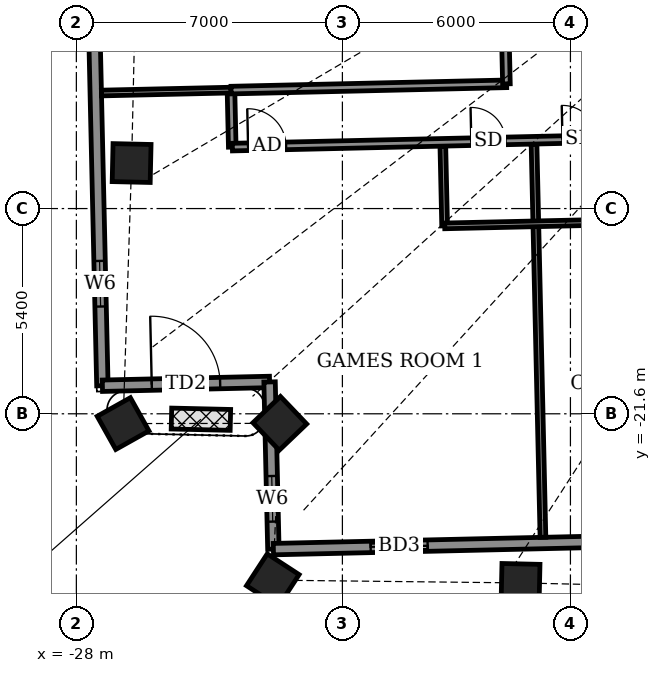
"""IFC4 building model, lengths in metres.
Left out: names, types, materials, properties, quantities, classifications, styles, units other than length and angle.
Written with IfcOpenShell. Run it as: python <this file> out.ifc"""

import sys

from ifc_helpers import new_model, si_unit, direction, frame, frame_2d, origin, origin_2d, place, context, subcontext, project, spatial, rectangle, extrude, element, fill, save


model = new_model("IFC4")
c1 = context("Model", 3, precision=1e-05, world=origin(), true_north=direction((0.0, 1.0)))
c2 = subcontext(c1, "Body", "Model", "MODEL_VIEW")
j1 = project(units=[si_unit("LENGTHUNIT", "METRE"), si_unit("PLANEANGLEUNIT", "RADIAN")], contexts=[c1])
p1 = place(None, origin())
s1 = spatial("IfcSite", under=j1, at=p1, CompositionType="ELEMENT")
p2 = place(p1, origin())
s2 = spatial("IfcBuilding", under=s1, at=p2, CompositionType="ELEMENT")
p3 = place(p2, frame((0.0, 0.0, 275.3)))
s3 = spatial("IfcBuildingStorey", under=s2, at=p3, CompositionType="ELEMENT", Elevation=275.3)
for number, where, z_axis, x_axis in (
    (1, (-26.546, -15.002, -0.55), (0.0, 0.0, 1.0), (-0.023, -1.0, 0.0)),
    (2, (-26.771, -21.858, -0.55), (0.0, 0.0, 1.0), (0.489, -0.872, 0.0)),
    (3, (-22.646, -21.852, -0.55), (0.0, 0.0, 1.0), (0.691, -0.723, 0.0)),
    (4, (-22.831, -25.977, -0.55), (0.0, 0.0, 1.0), (0.838, -0.546, 0.0)),
    (5, (-16.313, -26.05, -0.55), (0.0, 0.0, 1.0), (1.0, -0.023, 0.0)),
):
    element("IfcColumn", number, at=place(p3, frame(where, z_axis=z_axis, x_axis=x_axis)), inside=s3, PredefinedType="COLUMN", context=c2, shape_type="SweptSolid", body=[
        extrude(rectangle(XDim=1.0, YDim=1.0, at=origin_2d()), origin(), (0.0, 0.0, 1.0), 4.6),
    ])
p4 = place(p3, frame((-27.658, -5.735, 0.0), z_axis=(0.0, 0.0, 1.0), x_axis=(0.022670092247, -0.999743000434, 0.0)))
e6 = element("IfcWall", 6, at=p4, inside=s3, PredefinedType="SOLIDWALL", context=c2, shape_type="SweptSolid", body=[
    extrude(rectangle(XDim=15.131, YDim=0.3, at=frame_2d((7.565, 0.0))), origin(), (0.0, 0.0, 1.0), 2.35),
])
p5 = place(p4, frame((4.194, 0.0, 0.0)))
e7 = element("IfcOpeningElement", 7, at=p5, cuts=e6, PredefinedType="OPENING", context=c2, shape_type="SweptSolid", body=[
    extrude(rectangle(XDim=1.5, YDim=2.0, at=frame_2d((0.75, 1.0))), frame((0.0, 0.16, 0.0), z_axis=(0.0, -1.0, 0.0), x_axis=(1.0, 0.0, 0.0)), (0.0, 0.0, 1.0), 0.32),
])
p6 = place(p4, frame((11.846, 0.0, 0.5)))
e8 = element("IfcOpeningElement", 8, at=p6, cuts=e6, PredefinedType="OPENING", context=c2, shape_type="SweptSolid", body=[
    extrude(rectangle(XDim=1.2, YDim=1.1, at=frame_2d((0.6, 0.55))), frame((0.0, 0.16, 0.0), z_axis=(0.0, -1.0, 0.0), x_axis=(1.0, 0.0, 0.0)), (0.0, 0.0, 1.0), 0.32),
])
p7 = place(p3, frame((-27.315, -20.862, 0.0), z_axis=(0.0, 0.0, 1.0), x_axis=(0.999741204967, 0.022749133868, 0.0)))
e9 = element("IfcWall", 9, at=p7, inside=s3, PredefinedType="SOLIDWALL", context=c2, shape_type="SweptSolid", body=[
    extrude(rectangle(XDim=4.4, YDim=0.3, at=frame_2d((2.2, 0.0))), origin(), (0.0, 0.0, 1.0), 2.35),
])
p8 = place(p7, frame((1.299, 0.0, 0.0)))
e10 = element("IfcOpeningElement", 10, at=p8, cuts=e9, PredefinedType="OPENING", context=c2, shape_type="SweptSolid", body=[
    extrude(rectangle(XDim=1.8, YDim=2.0, at=frame_2d((0.9, 1.0))), frame((0.0, 0.16, 0.0), z_axis=(0.0, -1.0, 0.0), x_axis=(1.0, 0.0, 0.0)), (0.0, 0.0, 1.0), 0.32),
])
p9 = place(p3, frame((-22.916, -20.762, 0.0), z_axis=(0.0, 0.0, 1.0), x_axis=(0.022749133868, -0.999741204967, 0.0)))
e11 = element("IfcWall", 11, at=p9, inside=s3, PredefinedType="SOLIDWALL", context=c2, shape_type="SweptSolid", body=[
    extrude(rectangle(XDim=4.4, YDim=0.3, at=frame_2d((2.2, 0.0))), origin(), (0.0, 0.0, 1.0), 2.35),
])
p10 = place(p9, frame((2.476, 0.0, 0.5)))
e12 = element("IfcOpeningElement", 12, at=p10, cuts=e11, PredefinedType="OPENING", context=c2, shape_type="SweptSolid", body=[
    extrude(rectangle(XDim=1.2, YDim=1.1, at=frame_2d((0.6, 0.55))), frame((0.0, 0.16, 0.0), z_axis=(0.0, -1.0, 0.0), x_axis=(1.0, 0.0, 0.0)), (0.0, 0.0, 1.0), 0.32),
])
p11 = place(p3, frame((-22.816, -25.161, 0.0), z_axis=(0.0, 0.0, 1.0), x_axis=(0.999742646411, 0.022685699159, 0.0)))
e13 = element("IfcWall", 13, at=p11, inside=s3, PredefinedType="SOLIDWALL", context=c2, shape_type="SweptSolid", body=[
    extrude(rectangle(XDim=49.236, YDim=0.3, at=frame_2d((24.618, 0.0))), origin(), (0.0, 0.0, 1.0), 2.1),
])
p12 = place(p11, frame((2.56, 0.0, 0.0)))
e14 = element("IfcOpeningElement", 14, at=p12, cuts=e13, PredefinedType="OPENING", context=c2, shape_type="SweptSolid", body=[
    extrude(rectangle(XDim=1.5, YDim=2.0, at=frame_2d((0.75, 1.0))), frame((0.0, 0.16, 0.0), z_axis=(0.0, -1.0, 0.0), x_axis=(1.0, 0.0, 0.0)), (0.0, 0.0, 1.0), 0.32),
])
p13 = place(p11, frame((9.417, 0.0, 0.5)))
e15 = element("IfcOpeningElement", 15, at=p13, cuts=e13, PredefinedType="OPENING", context=c2, shape_type="SweptSolid", body=[
    extrude(rectangle(XDim=1.2, YDim=1.1, at=frame_2d((0.6, 0.55))), frame((0.0, 0.16, 0.0), z_axis=(0.0, -1.0, 0.0), x_axis=(1.0, 0.0, 0.0)), (0.0, 0.0, 1.0), 0.32),
])
p14 = place(p11, frame((15.664, 0.0, 0.5)))
e16 = element("IfcOpeningElement", 16, at=p14, cuts=e13, PredefinedType="OPENING", context=c2, shape_type="SweptSolid", body=[
    extrude(rectangle(XDim=1.2, YDim=1.1, at=frame_2d((0.6, 0.55))), frame((0.0, 0.16, 0.0), z_axis=(0.0, -1.0, 0.0), x_axis=(1.0, 0.0, 0.0)), (0.0, 0.0, 1.0), 0.32),
])
p15 = place(p11, frame((21.326, 0.0, 0.0)))
e17 = element("IfcOpeningElement", 17, at=p15, cuts=e13, PredefinedType="OPENING", context=c2, shape_type="SweptSolid", body=[
    extrude(rectangle(XDim=1.5, YDim=2.0, at=frame_2d((0.75, 1.0))), frame((0.0, 0.16, 0.0), z_axis=(0.0, -1.0, 0.0), x_axis=(1.0, 0.0, 0.0)), (0.0, 0.0, 1.0), 0.32),
])
p16 = place(p11, frame((25.575, 0.0, 0.0)))
e18 = element("IfcOpeningElement", 18, at=p16, cuts=e13, PredefinedType="OPENING", context=c2, shape_type="SweptSolid", body=[
    extrude(rectangle(XDim=1.5, YDim=2.0, at=frame_2d((0.75, 1.0))), frame((0.0, 0.16, 0.0), z_axis=(0.0, -1.0, 0.0), x_axis=(1.0, 0.0, 0.0)), (0.0, 0.0, 1.0), 0.32),
])
p17 = place(p11, frame((30.5, 0.0, 0.0)))
e19 = element("IfcOpeningElement", 19, at=p17, cuts=e13, PredefinedType="OPENING", context=c2, shape_type="SweptSolid", body=[
    extrude(rectangle(XDim=1.5, YDim=2.0, at=frame_2d((0.75, 1.0))), frame((0.0, 0.16, 0.0), z_axis=(0.0, -1.0, 0.0), x_axis=(1.0, 0.0, 0.0)), (0.0, 0.0, 1.0), 0.32),
])
p18 = place(p11, frame((35.425, 0.0, 0.0)))
e20 = element("IfcOpeningElement", 20, at=p18, cuts=e13, PredefinedType="OPENING", context=c2, shape_type="SweptSolid", body=[
    extrude(rectangle(XDim=1.5, YDim=2.0, at=frame_2d((0.75, 1.0))), frame((0.0, 0.16, 0.0), z_axis=(0.0, -1.0, 0.0), x_axis=(1.0, 0.0, 0.0)), (0.0, 0.0, 1.0), 0.32),
])
p19 = place(p11, frame((41.7, 0.0, 0.5)))
e21 = element("IfcOpeningElement", 21, at=p19, cuts=e13, PredefinedType="OPENING", context=c2, shape_type="SweptSolid", body=[
    extrude(rectangle(XDim=1.2, YDim=1.1, at=frame_2d((0.6, 0.55))), frame((0.0, 0.16, 0.0), z_axis=(0.0, -1.0, 0.0), x_axis=(1.0, 0.0, 0.0)), (0.0, 0.0, 1.0), 0.32),
])
p20 = place(p11, frame((47.068, 0.0, 0.5)))
e22 = element("IfcOpeningElement", 22, at=p20, cuts=e13, PredefinedType="OPENING", context=c2, shape_type="SweptSolid", body=[
    extrude(rectangle(XDim=1.2, YDim=1.1, at=frame_2d((0.6, 0.55))), frame((0.0, 0.16, 0.0), z_axis=(0.0, -1.0, 0.0), x_axis=(1.0, 0.0, 0.0)), (0.0, 0.0, 1.0), 0.32),
])
p21 = place(p3, frame((-23.947, -21.761, 0.0), z_axis=(0.0, 0.0, 1.0), x_axis=(-0.999732408314, 0.023132482925, 0.0)))
e23 = element("IfcWall", 23, at=p21, inside=s3, PredefinedType="USERDEFINED", context=c2, shape_type="SweptSolid", body=[
    extrude(rectangle(XDim=1.552, YDim=0.55, at=frame_2d((0.776, 0.0))), origin(), (0.0, 0.0, 1.0), 0.8),
])
p22 = place(p3, frame((-15.723, -24.85, 0.0), z_axis=(0.0, 0.0, 1.0), x_axis=(-0.022716047022, 0.999741957311, 0.0)))
e24 = element("IfcWall", 24, at=p22, inside=s3, PredefinedType="PARTITIONING", context=c2, shape_type="SweptSolid", body=[
    extrude(rectangle(XDim=10.35, YDim=0.15, at=frame_2d((5.175, 0.0))), origin(), (0.0, 0.0, 1.0), 2.25),
])
p23 = place(p3, frame((-18.31, -16.656, 0.0), z_axis=(0.0, 0.0, 1.0), x_axis=(-0.022325208909, 0.999750761464, 0.0)))
e25 = element("IfcWall", 25, at=p23, inside=s3, PredefinedType="PARTITIONING", context=c2, shape_type="SweptSolid", body=[
    extrude(rectangle(XDim=2.1, YDim=0.15, at=frame_2d((1.05, 0.0))), origin(), (0.0, 0.0, 1.0), 2.55),
])
p24 = place(p3, frame((-18.308, -16.656, 0.0), z_axis=(0.0, 0.0, 1.0), x_axis=(0.999742701292, 0.022683280499, 0.0)))
e26 = element("IfcWall", 26, at=p24, inside=s3, PredefinedType="PARTITIONING", context=c2, shape_type="SweptSolid", body=[
    extrude(rectangle(XDim=4.8, YDim=0.15, at=frame_2d((2.4, 0.0))), origin(), (0.0, 0.0, 1.0), 2.25),
])
p25 = place(p3, frame((-23.898, -14.583, 0.0), z_axis=(0.0, 0.0, 1.0), x_axis=(-0.022617910375, 0.999744182344, 0.0)))
e27 = element("IfcWall", 27, at=p25, inside=s3, PredefinedType="PARTITIONING", context=c2, shape_type="SweptSolid", body=[
    extrude(rectangle(XDim=1.5, YDim=0.2, at=frame_2d((0.75, 0.0))), origin(), (0.0, 0.0, 1.0), 2.65),
])
p26 = place(p3, frame((-23.895, -14.583, 0.0), z_axis=(0.0, 0.0, 1.0), x_axis=(0.999742444101, 0.022694613067, 0.0)))
e28 = element("IfcWall", 28, at=p26, inside=s3, PredefinedType="PARTITIONING", context=c2, shape_type="SweptSolid", body=[
    extrude(rectangle(XDim=54.025, YDim=0.2, at=frame_2d((27.012, 0.0))), origin(), (0.0, 0.0, 1.0), 2.1),
])
p27 = place(p26, frame((0.414, 0.0, 0.0)))
e29 = element("IfcOpeningElement", 29, at=p27, cuts=e28, PredefinedType="OPENING", context=c2, shape_type="SweptSolid", body=[
    extrude(rectangle(XDim=1.0, YDim=2.1, at=frame_2d((0.5, 1.05))), frame((0.0, 0.11, 0.0), z_axis=(0.0, -1.0, 0.0), x_axis=(1.0, 0.0, 0.0)), (0.0, 0.0, 1.0), 0.22),
])
p28 = place(p26, frame((6.289, 0.0, 0.0)))
e30 = element("IfcOpeningElement", 30, at=p28, cuts=e28, PredefinedType="OPENING", context=c2, shape_type="SweptSolid", body=[
    extrude(rectangle(XDim=0.9, YDim=2.1, at=frame_2d((0.45, 1.05))), frame((0.0, 0.11, 0.0), z_axis=(0.0, -1.0, 0.0), x_axis=(1.0, 0.0, 0.0)), (0.0, 0.0, 1.0), 0.22),
])
p29 = place(p26, frame((11.589, 0.0, 0.0)))
e31 = element("IfcOpeningElement", 31, at=p29, cuts=e28, PredefinedType="OPENING", context=c2, shape_type="SweptSolid", body=[
    extrude(rectangle(XDim=1.0, YDim=2.1, at=frame_2d((0.5, 1.05))), frame((0.0, 0.11, 0.0), z_axis=(0.0, -1.0, 0.0), x_axis=(1.0, 0.0, 0.0)), (0.0, 0.0, 1.0), 0.22),
])
p30 = place(p26, frame((8.689, 0.0, 0.0)))
e32 = element("IfcOpeningElement", 32, at=p30, cuts=e28, PredefinedType="OPENING", context=c2, shape_type="SweptSolid", body=[
    extrude(rectangle(XDim=0.9, YDim=2.1, at=frame_2d((0.45, 1.05))), frame((0.0, 0.11, 0.0), z_axis=(0.0, -1.0, 0.0), x_axis=(1.0, 0.0, 0.0)), (0.0, 0.0, 1.0), 0.22),
])
p31 = place(p26, frame((15.014, 0.0, 0.0)))
e33 = element("IfcOpeningElement", 33, at=p31, cuts=e28, PredefinedType="OPENING", context=c2, shape_type="SweptSolid", body=[
    extrude(rectangle(XDim=1.0, YDim=2.1, at=frame_2d((0.5, 1.05))), frame((0.0, 0.11, 0.0), z_axis=(0.0, -1.0, 0.0), x_axis=(1.0, 0.0, 0.0)), (0.0, 0.0, 1.0), 0.22),
])
p32 = place(p26, frame((18.039, 0.0, 0.0)))
e34 = element("IfcOpeningElement", 34, at=p32, cuts=e28, PredefinedType="OPENING", context=c2, shape_type="SweptSolid", body=[
    extrude(rectangle(XDim=0.9, YDim=2.1, at=frame_2d((0.45, 1.05))), frame((0.0, 0.11, 0.0), z_axis=(0.0, -1.0, 0.0), x_axis=(1.0, 0.0, 0.0)), (0.0, 0.0, 1.0), 0.22),
])
p33 = place(p26, frame((22.989, 0.0, 0.0)))
e35 = element("IfcOpeningElement", 35, at=p33, cuts=e28, PredefinedType="OPENING", context=c2, shape_type="SweptSolid", body=[
    extrude(rectangle(XDim=0.9, YDim=2.1, at=frame_2d((0.45, 1.05))), frame((0.0, 0.11, 0.0), z_axis=(0.0, -1.0, 0.0), x_axis=(1.0, 0.0, 0.0)), (0.0, 0.0, 1.0), 0.22),
])
p34 = place(p26, frame((25.514, 0.0, 0.0)))
e36 = element("IfcOpeningElement", 36, at=p34, cuts=e28, PredefinedType="OPENING", context=c2, shape_type="SweptSolid", body=[
    extrude(rectangle(XDim=0.9, YDim=2.1, at=frame_2d((0.45, 1.05))), frame((0.0, 0.11, 0.0), z_axis=(0.0, -1.0, 0.0), x_axis=(1.0, 0.0, 0.0)), (0.0, 0.0, 1.0), 0.22),
])
p35 = place(p26, frame((32.839, 0.0, 0.0)))
e37 = element("IfcOpeningElement", 37, at=p35, cuts=e28, PredefinedType="OPENING", context=c2, shape_type="SweptSolid", body=[
    extrude(rectangle(XDim=0.9, YDim=2.1, at=frame_2d((0.45, 1.05))), frame((0.0, 0.11, 0.0), z_axis=(0.0, -1.0, 0.0), x_axis=(1.0, 0.0, 0.0)), (0.0, 0.0, 1.0), 0.22),
])
p36 = place(p26, frame((35.364, 0.0, 0.0)))
e38 = element("IfcOpeningElement", 38, at=p36, cuts=e28, PredefinedType="OPENING", context=c2, shape_type="SweptSolid", body=[
    extrude(rectangle(XDim=0.9, YDim=2.1, at=frame_2d((0.45, 1.05))), frame((0.0, 0.11, 0.0), z_axis=(0.0, -1.0, 0.0), x_axis=(1.0, 0.0, 0.0)), (0.0, 0.0, 1.0), 0.22),
])
p37 = place(p26, frame((43.939, 0.0, 0.0)))
e39 = element("IfcOpeningElement", 39, at=p37, cuts=e28, PredefinedType="OPENING", context=c2, shape_type="SweptSolid", body=[
    extrude(rectangle(XDim=1.0, YDim=2.1, at=frame_2d((0.5, 1.05))), frame((0.0, 0.11, 0.0), z_axis=(0.0, -1.0, 0.0), x_axis=(1.0, 0.0, 0.0)), (0.0, 0.0, 1.0), 0.22),
])
p38 = place(p26, frame((40.339, 0.0, 0.0)))
e40 = element("IfcOpeningElement", 40, at=p38, cuts=e28, PredefinedType="OPENING", context=c2, shape_type="SweptSolid", body=[
    extrude(rectangle(XDim=0.9, YDim=2.1, at=frame_2d((0.45, 1.05))), frame((0.0, 0.11, 0.0), z_axis=(0.0, -1.0, 0.0), x_axis=(1.0, 0.0, 0.0)), (0.0, 0.0, 1.0), 0.22),
])
p39 = place(p26, frame((50.035, 0.0, 0.0)))
e41 = element("IfcOpeningElement", 41, at=p39, cuts=e28, PredefinedType="OPENING", context=c2, shape_type="SweptSolid", body=[
    extrude(rectangle(XDim=1.0, YDim=2.1, at=frame_2d((0.5, 1.05))), frame((0.0, 0.11, 0.0), z_axis=(0.0, -1.0, 0.0), x_axis=(1.0, 0.0, 0.0)), (0.0, 0.0, 1.0), 0.22),
])
p40 = place(p3, frame((-27.34, -13.16, 0.0), z_axis=(0.0, 0.0, 1.0), x_axis=(0.999745956294, 0.022539362742, 0.0)))
e42 = element("IfcWall", 42, at=p40, inside=s3, PredefinedType="PARTITIONING", context=c2, shape_type="SweptSolid", body=[
    extrude(rectangle(XDim=3.412, YDim=0.15, at=frame_2d((1.706, 0.0))), origin(), (0.0, 0.0, 1.0), 2.35),
])
p41 = place(p3, frame((-23.929, -13.083, 0.0), z_axis=(0.0, 0.0, 1.0), x_axis=(0.999741000612, 0.022758112756, 0.0)))
e43 = element("IfcWall", 43, at=p41, inside=s3, PredefinedType="PARTITIONING", context=c2, shape_type="SweptSolid", body=[
    extrude(rectangle(XDim=7.252, YDim=0.2, at=frame_2d((3.626, 0.0))), origin(), (0.0, 0.0, 1.0), 2.55),
])
p42 = place(p3, frame((-16.684, -12.919, 0.0), z_axis=(0.0, 0.0, 1.0), x_axis=(-0.022712214871, 0.999742044377, 0.0)))
e44 = element("IfcWall", 44, at=p42, inside=s3, PredefinedType="PARTITIONING", context=c2, shape_type="SweptSolid", body=[
    extrude(rectangle(XDim=26.551, YDim=0.2, at=frame_2d((13.275, 0.0))), origin(), (0.0, 0.0, 1.0), 2.55),
])
p43 = place(p42, frame((22.088, 0.0, 0.0)))
e45 = element("IfcOpeningElement", 45, at=p43, cuts=e44, PredefinedType="OPENING", context=c2, shape_type="SweptSolid", body=[
    extrude(rectangle(XDim=1.0, YDim=2.1, at=frame_2d((0.5, 1.05))), frame((0.0, 0.11, 0.0), z_axis=(0.0, -1.0, 0.0), x_axis=(1.0, 0.0, 0.0)), (0.0, 0.0, 1.0), 0.22),
])
p44 = place(p42, frame((24.9, 0.0, 0.0)))
e46 = element("IfcOpeningElement", 46, at=p44, cuts=e44, PredefinedType="OPENING", context=c2, shape_type="SweptSolid", body=[
    extrude(rectangle(XDim=0.9, YDim=2.1, at=frame_2d((0.45, 1.05))), frame((0.0, 0.11, 0.0), z_axis=(0.0, -1.0, 0.0), x_axis=(1.0, 0.0, 0.0)), (0.0, 0.0, 1.0), 0.22),
])
p45 = place(p42, frame((17.0, 0.0, 0.0)))
e47 = element("IfcOpeningElement", 47, at=p45, cuts=e44, PredefinedType="OPENING", context=c2, shape_type="SweptSolid", body=[
    extrude(rectangle(XDim=1.0, YDim=2.1, at=frame_2d((0.5, 1.05))), frame((0.0, 0.11, 0.0), z_axis=(0.0, -1.0, 0.0), x_axis=(1.0, 0.0, 0.0)), (0.0, 0.0, 1.0), 0.22),
])
p46 = place(p42, frame((19.375, 0.0, 0.0)))
e48 = element("IfcOpeningElement", 48, at=p46, cuts=e44, PredefinedType="OPENING", context=c2, shape_type="SweptSolid", body=[
    extrude(rectangle(XDim=0.9, YDim=2.1, at=frame_2d((0.45, 1.05))), frame((0.0, 0.11, 0.0), z_axis=(0.0, -1.0, 0.0), x_axis=(1.0, 0.0, 0.0)), (0.0, 0.0, 1.0), 0.22),
])
p47 = place(p42, frame((12.475, 0.0, 0.0)))
e49 = element("IfcOpeningElement", 49, at=p47, cuts=e44, PredefinedType="OPENING", context=c2, shape_type="SweptSolid", body=[
    extrude(rectangle(XDim=1.0, YDim=2.1, at=frame_2d((0.5, 1.05))), frame((0.0, 0.11, 0.0), z_axis=(0.0, -1.0, 0.0), x_axis=(1.0, 0.0, 0.0)), (0.0, 0.0, 1.0), 0.22),
])
p48 = place(p42, frame((14.725, 0.0, 0.0)))
e50 = element("IfcOpeningElement", 50, at=p48, cuts=e44, PredefinedType="OPENING", context=c2, shape_type="SweptSolid", body=[
    extrude(rectangle(XDim=0.9, YDim=2.1, at=frame_2d((0.45, 1.05))), frame((0.0, 0.11, 0.0), z_axis=(0.0, -1.0, 0.0), x_axis=(1.0, 0.0, 0.0)), (0.0, 0.0, 1.0), 0.22),
])
p49 = place(p42, frame((10.425, 0.0, 0.0)))
e51 = element("IfcOpeningElement", 51, at=p49, cuts=e44, PredefinedType="OPENING", context=c2, shape_type="SweptSolid", body=[
    extrude(rectangle(XDim=1.0, YDim=2.1, at=frame_2d((0.5, 1.05))), frame((0.0, 0.11, 0.0), z_axis=(0.0, -1.0, 0.0), x_axis=(1.0, 0.0, 0.0)), (0.0, 0.0, 1.0), 0.22),
])
p50 = place(p42, frame((8.125, 0.0, 0.0)))
e52 = element("IfcOpeningElement", 52, at=p50, cuts=e44, PredefinedType="OPENING", context=c2, shape_type="SweptSolid", body=[
    extrude(rectangle(XDim=0.9, YDim=2.1, at=frame_2d((0.45, 1.05))), frame((0.0, 0.11, 0.0), z_axis=(0.0, -1.0, 0.0), x_axis=(1.0, 0.0, 0.0)), (0.0, 0.0, 1.0), 0.22),
])
p51 = place(p42, frame((1.937, 0.0, 0.0)))
e53 = element("IfcOpeningElement", 53, at=p51, cuts=e44, PredefinedType="OPENING", context=c2, shape_type="SweptSolid", body=[
    extrude(rectangle(XDim=1.0, YDim=2.1, at=frame_2d((0.5, 1.05))), frame((0.0, 0.11, 0.0), z_axis=(0.0, -1.0, 0.0), x_axis=(1.0, 0.0, 0.0)), (0.0, 0.0, 1.0), 0.22),
])
p52 = place(p42, frame((5.625, 0.0, 0.0)))
e54 = element("IfcOpeningElement", 54, at=p52, cuts=e44, PredefinedType="OPENING", context=c2, shape_type="SweptSolid", body=[
    extrude(rectangle(XDim=0.9, YDim=2.1, at=frame_2d((0.45, 1.05))), frame((0.0, 0.11, 0.0), z_axis=(0.0, -1.0, 0.0), x_axis=(1.0, 0.0, 0.0)), (0.0, 0.0, 1.0), 0.22),
])
p53 = place(p6, origin())
e55 = element("IfcWindow", 55, at=p53, inside=s3, PartitioningType="SINGLE_PANEL", PredefinedType="WINDOW", context=c2, shape_type="SweptSolid", body=[
    extrude(rectangle(XDim=1.2, YDim=1.1, at=frame_2d((0.6, 0.55))), frame((0.0, 0.03, 0.0), z_axis=(0.0, -1.0, 0.0), x_axis=(1.0, 0.0, 0.0)), (0.0, 0.0, 1.0), 0.06),
])
fill(e8, e55)
p54 = place(p8, origin())
e56 = element("IfcDoor", 56, at=p54, inside=s3, OperationType="DOUBLE_DOOR_SINGLE_SWING", PredefinedType="DOOR", context=c2, shape_type="SweptSolid", body=[
    extrude(rectangle(XDim=1.8, YDim=2.0, at=frame_2d((0.9, 1.0))), frame((0.0, 0.025, 0.0), z_axis=(0.0, -1.0, 0.0), x_axis=(1.0, 0.0, 0.0)), (0.0, 0.0, 1.0), 0.05),
])
fill(e10, e56)
p55 = place(p10, origin())
e57 = element("IfcWindow", 57, at=p55, inside=s3, PartitioningType="SINGLE_PANEL", PredefinedType="WINDOW", context=c2, shape_type="SweptSolid", body=[
    extrude(rectangle(XDim=1.2, YDim=1.1, at=frame_2d((0.6, 0.55))), frame((0.0, 0.03, 0.0), z_axis=(0.0, -1.0, 0.0), x_axis=(1.0, 0.0, 0.0)), (0.0, 0.0, 1.0), 0.06),
])
fill(e12, e57)
p56 = place(p12, origin())
e58 = element("IfcDoor", 58, at=p56, inside=s3, OperationType="SLIDING_TO_LEFT", PredefinedType="DOOR", context=c2, shape_type="SweptSolid", body=[
    extrude(rectangle(XDim=1.5, YDim=2.0, at=frame_2d((0.75, 1.0))), frame((0.0, 0.025, 0.0), z_axis=(0.0, -1.0, 0.0), x_axis=(1.0, 0.0, 0.0)), (0.0, 0.0, 1.0), 0.05),
])
fill(e14, e58)
p57 = place(p27, origin())
e59 = element("IfcDoor", 59, at=p57, inside=s3, OperationType="SINGLE_SWING_LEFT", PredefinedType="DOOR", context=c2, shape_type="SweptSolid", body=[
    extrude(rectangle(XDim=1.0, YDim=2.1, at=frame_2d((0.5, 1.05))), frame((0.0, 0.025, 0.0), z_axis=(0.0, -1.0, 0.0), x_axis=(1.0, 0.0, 0.0)), (0.0, 0.0, 1.0), 0.05),
])
fill(e29, e59)
p58 = place(p28, origin())
e60 = element("IfcDoor", 60, at=p58, inside=s3, OperationType="SINGLE_SWING_LEFT", PredefinedType="DOOR", context=c2, shape_type="SweptSolid", body=[
    extrude(rectangle(XDim=0.9, YDim=2.1, at=frame_2d((0.45, 1.05))), frame((0.0, 0.025, 0.0), z_axis=(0.0, -1.0, 0.0), x_axis=(1.0, 0.0, 0.0)), (0.0, 0.0, 1.0), 0.05),
])
fill(e30, e60)
p59 = place(p30, origin())
e61 = element("IfcDoor", 61, at=p59, inside=s3, OperationType="SINGLE_SWING_RIGHT", PredefinedType="DOOR", context=c2, shape_type="SweptSolid", body=[
    extrude(rectangle(XDim=0.9, YDim=2.1, at=frame_2d((0.45, 1.05))), frame((0.0, 0.025, 0.0), z_axis=(0.0, -1.0, 0.0), x_axis=(1.0, 0.0, 0.0)), (0.0, 0.0, 1.0), 0.05),
])
fill(e32, e61)
save(model, sys.argv[1])
